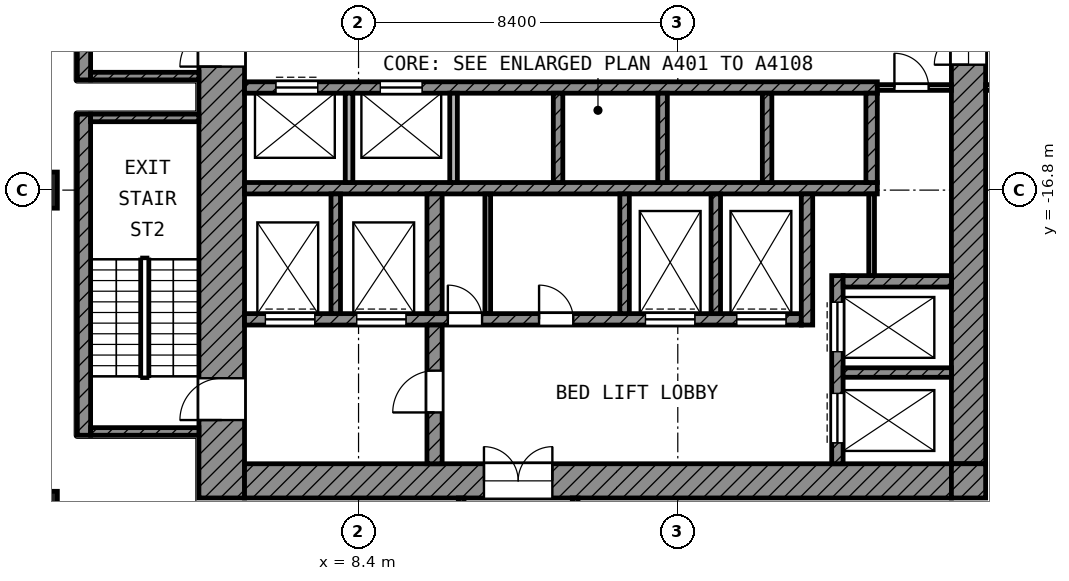
"""IFC4 building model, lengths in metres.
Left out: names, types, materials, properties, quantities, classifications, styles, units other than length and angle.
Written with IfcOpenShell. Run it as: python <this file> out.ifc"""

import sys

from ifc_helpers import new_model, si_unit, direction, frame, frame_2d, origin, origin_2d, place, context, subcontext, project, spatial, rectangle, extrude, element, fill, save


model = new_model("IFC4")
c1 = context("Model", 3, precision=1e-05, world=origin(), true_north=direction((0.0, 1.0)))
c2 = subcontext(c1, "Body", "Model", "MODEL_VIEW")
j1 = project(units=[si_unit("LENGTHUNIT", "METRE"), si_unit("PLANEANGLEUNIT", "RADIAN")], contexts=[c1])
p1 = place(None, origin())
s1 = spatial("IfcSite", under=j1, at=p1, CompositionType="ELEMENT")
p2 = place(p1, origin())
s2 = spatial("IfcBuilding", under=s1, at=p2, CompositionType="ELEMENT")
p3 = place(p2, frame((0.0, 0.0, 171.0)))
s3 = spatial("IfcBuildingStorey", under=s2, at=p3, CompositionType="ELEMENT", Elevation=171.0)
for number, where, z_axis, x_axis in (
    (1, (0.0, -16.8, 0.0), (0.0, 0.0, 1.0), (1.0, 0.0, 0.0)),
    (2, (0.0, -25.2, 0.0), (0.0, 0.0, 1.0), (1.0, 0.0, 0.0)),
):
    element("IfcColumn", number, at=place(p3, frame(where, z_axis=z_axis, x_axis=x_axis)), inside=s3, PredefinedType="COLUMN", context=c2, shape_type="SweptSolid", body=[
        extrude(rectangle(XDim=0.95, YDim=0.95, at=origin_2d()), origin(), (0.0, 0.0, 1.0), 4.2),
    ])
p4 = place(p3, frame((4.8, -24.9, 0.0), z_axis=(0.0, 0.0, 1.0), x_axis=(0.0, 1.0, 0.0)))
e3 = element("IfcWall", 3, at=p4, inside=s3, PredefinedType="SHEAR", context=c2, shape_type="SweptSolid", body=[
    extrude(rectangle(XDim=19.5, YDim=1.2, at=frame_2d((9.75, 0.0))), origin(), (0.0, 0.0, 1.0), 3.6),
])
p5 = place(p4, frame((11.35, 0.0, 0.0)))
e4 = element("IfcOpeningElement", 4, at=p5, cuts=e3, PredefinedType="OPENING", context=c2, shape_type="SweptSolid", body=[
    extrude(rectangle(XDim=1.1, YDim=2.1, at=frame_2d((0.55, 1.05))), frame((0.0, 0.61, 0.0), z_axis=(0.0, -1.0, 0.0), x_axis=(1.0, 0.0, 0.0)), (0.0, 0.0, 1.0), 1.22),
])
p6 = place(p4, frame((2.05, 0.0, 0.0)))
e5 = element("IfcOpeningElement", 5, at=p6, cuts=e3, PredefinedType="OPENING", context=c2, shape_type="SweptSolid", body=[
    extrude(rectangle(XDim=1.1, YDim=2.1, at=frame_2d((0.55, 1.05))), frame((0.0, 0.61, 0.0), z_axis=(0.0, -1.0, 0.0), x_axis=(1.0, 0.0, 0.0)), (0.0, 0.0, 1.0), 1.22),
])
p7 = place(p3, frame((24.45, -24.0, 0.0), z_axis=(0.0, 0.0, 1.0), x_axis=(0.0, 1.0, 0.0)))
e6 = element("IfcWall", 6, at=p7, inside=s3, PredefinedType="SHEAR", context=c2, shape_type="SweptSolid", body=[
    extrude(rectangle(XDim=18.6, YDim=0.9, at=frame_2d((9.3, 0.0))), origin(), (0.0, 0.0, 1.0), 3.6),
])
p8 = place(p7, frame((10.5, 0.0, 0.0)))
e7 = element("IfcOpeningElement", 7, at=p8, cuts=e6, PredefinedType="OPENING", context=c2, shape_type="SweptSolid", body=[
    extrude(rectangle(XDim=1.8, YDim=2.1, at=frame_2d((0.9, 1.05))), frame((0.0, 0.46, 0.0), z_axis=(0.0, -1.0, 0.0), x_axis=(1.0, 0.0, 0.0)), (0.0, 0.0, 1.0), 0.92),
])
p9 = place(p3, frame((5.4, -24.45, 0.0), z_axis=(0.0, 0.0, 1.0), x_axis=(1.0, 0.0, 0.0)))
e8 = element("IfcWall", 8, at=p9, inside=s3, PredefinedType="SHEAR", context=c2, shape_type="SweptSolid", body=[
    extrude(rectangle(XDim=18.6, YDim=0.9, at=frame_2d((9.3, 0.0))), origin(), (0.0, 0.0, 1.0), 3.6),
])
p10 = place(p9, frame((6.3, 0.0, 0.0)))
e9 = element("IfcOpeningElement", 9, at=p10, cuts=e8, PredefinedType="OPENING", context=c2, shape_type="SweptSolid", body=[
    extrude(rectangle(XDim=1.8, YDim=2.1, at=frame_2d((0.9, 1.05))), frame((0.0, 0.46, 0.0), z_axis=(0.0, -1.0, 0.0), x_axis=(1.0, 0.0, 0.0)), (0.0, 0.0, 1.0), 0.92),
])
p11 = place(p3, frame((24.45, -24.9, 0.0), z_axis=(0.0, 0.0, 1.0), x_axis=(0.0, 1.0, 0.0)))
e10 = element("IfcWall", 10, at=p11, inside=s3, PredefinedType="SHEAR", context=c2, shape_type="SweptSolid", body=[
    extrude(rectangle(XDim=0.9, YDim=0.9, at=frame_2d((0.45, 0.0))), origin(), (0.0, 0.0, 1.0), 3.6),
])
p12 = place(p3, frame((5.4, -14.1, 0.0), z_axis=(0.0, 0.0, 1.0), x_axis=(1.0, 0.0, 0.0)))
e11 = element("IfcWall", 11, at=p12, inside=s3, PredefinedType="SHEAR", context=c2, shape_type="SweptSolid", body=[
    extrude(rectangle(XDim=16.65, YDim=0.3, at=frame_2d((8.325, 0.0))), origin(), (0.0, 0.0, 1.0), 3.6),
])
p13 = place(p12, frame((0.825, 0.0, 0.0)))
e12 = element("IfcOpeningElement", 12, at=p13, cuts=e11, PredefinedType="OPENING", context=c2, shape_type="SweptSolid", body=[
    extrude(rectangle(XDim=1.1, YDim=2.1, at=frame_2d((0.55, 1.05))), frame((0.0, 0.16, 0.0), z_axis=(0.0, -1.0, 0.0), x_axis=(1.0, 0.0, 0.0)), (0.0, 0.0, 1.0), 0.32),
])
p14 = place(p12, frame((3.575, 0.0, 0.0)))
e13 = element("IfcOpeningElement", 13, at=p14, cuts=e11, PredefinedType="OPENING", context=c2, shape_type="SweptSolid", body=[
    extrude(rectangle(XDim=1.1, YDim=2.1, at=frame_2d((0.55, 1.05))), frame((0.0, 0.16, 0.0), z_axis=(0.0, -1.0, 0.0), x_axis=(1.0, 0.0, 0.0)), (0.0, 0.0, 1.0), 0.32),
])
p15 = place(p3, frame((5.4, -16.75, 0.0), z_axis=(0.0, 0.0, 1.0), x_axis=(1.0, 0.0, 0.0)))
e14 = element("IfcWall", 14, at=p15, inside=s3, PredefinedType="SHEAR", context=c2, shape_type="SweptSolid", body=[
    extrude(rectangle(XDim=16.65, YDim=0.3, at=frame_2d((8.325, 0.0))), origin(), (0.0, 0.0, 1.0), 3.6),
])
p16 = place(p3, frame((5.4, -20.2, 0.0), z_axis=(0.0, 0.0, 1.0), x_axis=(1.0, 0.0, 0.0)))
e15 = element("IfcWall", 15, at=p16, inside=s3, PredefinedType="SHEAR", context=c2, shape_type="SweptSolid", body=[
    extrude(rectangle(XDim=14.65, YDim=0.3, at=frame_2d((7.325, 0.0))), origin(), (0.0, 0.0, 1.0), 3.6),
])
p17 = place(p16, frame((10.55, 0.0, 0.0)))
e16 = element("IfcOpeningElement", 16, at=p17, cuts=e15, PredefinedType="OPENING", context=c2, shape_type="SweptSolid", body=[
    extrude(rectangle(XDim=1.3, YDim=2.1, at=frame_2d((0.65, 1.05))), frame((0.0, 0.16, 0.0), z_axis=(0.0, -1.0, 0.0), x_axis=(1.0, 0.0, 0.0)), (0.0, 0.0, 1.0), 0.32),
])
p18 = place(p16, frame((12.95, 0.0, 0.0)))
e17 = element("IfcOpeningElement", 17, at=p18, cuts=e15, PredefinedType="OPENING", context=c2, shape_type="SweptSolid", body=[
    extrude(rectangle(XDim=1.3, YDim=2.1, at=frame_2d((0.65, 1.05))), frame((0.0, 0.16, 0.0), z_axis=(0.0, -1.0, 0.0), x_axis=(1.0, 0.0, 0.0)), (0.0, 0.0, 1.0), 0.32),
])
p19 = place(p16, frame((0.55, 0.0, 0.0)))
e18 = element("IfcOpeningElement", 18, at=p19, cuts=e15, PredefinedType="OPENING", context=c2, shape_type="SweptSolid", body=[
    extrude(rectangle(XDim=1.3, YDim=2.1, at=frame_2d((0.65, 1.05))), frame((0.0, 0.16, 0.0), z_axis=(0.0, -1.0, 0.0), x_axis=(1.0, 0.0, 0.0)), (0.0, 0.0, 1.0), 0.32),
])
p20 = place(p16, frame((2.95, 0.0, 0.0)))
e19 = element("IfcOpeningElement", 19, at=p20, cuts=e15, PredefinedType="OPENING", context=c2, shape_type="SweptSolid", body=[
    extrude(rectangle(XDim=1.3, YDim=2.1, at=frame_2d((0.65, 1.05))), frame((0.0, 0.16, 0.0), z_axis=(0.0, -1.0, 0.0), x_axis=(1.0, 0.0, 0.0)), (0.0, 0.0, 1.0), 0.32),
])
p21 = place(p16, frame((5.35, 0.0, 0.0)))
e20 = element("IfcOpeningElement", 20, at=p21, cuts=e15, PredefinedType="OPENING", context=c2, shape_type="SweptSolid", body=[
    extrude(rectangle(XDim=0.9, YDim=2.1, at=frame_2d((0.45, 1.05))), frame((0.0, 0.16, 0.0), z_axis=(0.0, -1.0, 0.0), x_axis=(1.0, 0.0, 0.0)), (0.0, 0.0, 1.0), 0.32),
])
p22 = place(p16, frame((7.75, 0.0, 0.0)))
e21 = element("IfcOpeningElement", 21, at=p22, cuts=e15, PredefinedType="OPENING", context=c2, shape_type="SweptSolid", body=[
    extrude(rectangle(XDim=0.9, YDim=2.1, at=frame_2d((0.45, 1.05))), frame((0.0, 0.16, 0.0), z_axis=(0.0, -1.0, 0.0), x_axis=(1.0, 0.0, 0.0)), (0.0, 0.0, 1.0), 0.32),
])
p23 = place(p3, frame((10.4, -24.0, 0.0), z_axis=(0.0, 0.0, 1.0), x_axis=(0.0, 1.0, 0.0)))
e22 = element("IfcWall", 22, at=p23, inside=s3, PredefinedType="SHEAR", context=c2, shape_type="SweptSolid", body=[
    extrude(rectangle(XDim=3.65, YDim=0.4, at=frame_2d((1.825, 0.0))), origin(), (0.0, 0.0, 1.0), 3.6),
])
p24 = place(p23, frame((1.35, 0.0, 0.0)))
e23 = element("IfcOpeningElement", 23, at=p24, cuts=e22, PredefinedType="OPENING", context=c2, shape_type="SweptSolid", body=[
    extrude(rectangle(XDim=1.1, YDim=2.1, at=frame_2d((0.55, 1.05))), frame((0.0, 0.21, 0.0), z_axis=(0.0, -1.0, 0.0), x_axis=(1.0, 0.0, 0.0)), (0.0, 0.0, 1.0), 0.42),
])
p25 = place(p3, frame((10.4, -20.05, 0.0), z_axis=(0.0, 0.0, 1.0), x_axis=(0.0, 1.0, 0.0)))
e24 = element("IfcWall", 24, at=p25, inside=s3, PredefinedType="SHEAR", context=c2, shape_type="SweptSolid", body=[
    extrude(rectangle(XDim=3.15, YDim=0.4, at=frame_2d((1.575, 0.0))), origin(), (0.0, 0.0, 1.0), 3.6),
])
p26 = place(p3, frame((20.2, -20.35, 0.0), z_axis=(0.0, 0.0, 1.0), x_axis=(0.0, 1.0, 0.0)))
e25 = element("IfcWall", 25, at=p26, inside=s3, PredefinedType="SHEAR", context=c2, shape_type="SweptSolid", body=[
    extrude(rectangle(XDim=3.45, YDim=0.3, at=frame_2d((1.725, 0.0))), origin(), (0.0, 0.0, 1.0), 3.6),
])
p27 = place(p3, frame((21.9, -16.6, 0.0), z_axis=(0.0, 0.0, 1.0), x_axis=(0.0, 1.0, 0.0)))
e26 = element("IfcWall", 26, at=p27, inside=s3, PredefinedType="SHEAR", context=c2, shape_type="SweptSolid", body=[
    extrude(rectangle(XDim=2.35, YDim=0.3, at=frame_2d((1.175, 0.0))), origin(), (0.0, 0.0, 1.0), 3.6),
])
p28 = place(p3, frame((21.15, -19.2, 0.0), z_axis=(0.0, 0.0, 1.0), x_axis=(1.0, 0.0, 0.0)))
e27 = element("IfcWall", 27, at=p28, inside=s3, PredefinedType="SHEAR", context=c2, shape_type="SweptSolid", body=[
    extrude(rectangle(XDim=2.85, YDim=0.3, at=frame_2d((1.425, 0.0))), origin(), (0.0, 0.0, 1.0), 3.6),
])
p29 = place(p3, frame((21.0, -24.0, 0.0), z_axis=(0.0, 0.0, 1.0), x_axis=(0.0, 1.0, 0.0)))
e28 = element("IfcWall", 28, at=p29, inside=s3, PredefinedType="SHEAR", context=c2, shape_type="SweptSolid", body=[
    extrude(rectangle(XDim=4.95, YDim=0.3, at=frame_2d((2.475, 0.0))), origin(), (0.0, 0.0, 1.0), 3.6),
])
p30 = place(p29, frame((2.95, 0.0, 0.0)))
e29 = element("IfcOpeningElement", 29, at=p30, cuts=e28, PredefinedType="OPENING", context=c2, shape_type="SweptSolid", body=[
    extrude(rectangle(XDim=1.3, YDim=2.1, at=frame_2d((0.65, 1.05))), frame((0.0, 0.16, 0.0), z_axis=(0.0, -1.0, 0.0), x_axis=(1.0, 0.0, 0.0)), (0.0, 0.0, 1.0), 0.32),
])
p31 = place(p29, frame((0.55, 0.0, 0.0)))
e30 = element("IfcOpeningElement", 30, at=p31, cuts=e28, PredefinedType="OPENING", context=c2, shape_type="SweptSolid", body=[
    extrude(rectangle(XDim=1.3, YDim=2.1, at=frame_2d((0.65, 1.05))), frame((0.0, 0.16, 0.0), z_axis=(0.0, -1.0, 0.0), x_axis=(1.0, 0.0, 0.0)), (0.0, 0.0, 1.0), 0.32),
])
p32 = place(p3, frame((21.15, -21.6, 0.0), z_axis=(0.0, 0.0, 1.0), x_axis=(1.0, 0.0, 0.0)))
e31 = element("IfcWall", 31, at=p32, inside=s3, PredefinedType="SHEAR", context=c2, shape_type="SweptSolid", body=[
    extrude(rectangle(XDim=2.85, YDim=0.25, at=frame_2d((1.425, 0.0))), origin(), (0.0, 0.0, 1.0), 3.6),
])
for number, where, z_axis, x_axis in (
    (32, (7.8, -20.05, 0.0), (0.0, 0.0, 1.0), (0.0, 1.0, 0.0)),
    (33, (15.4, -20.05, 0.0), (0.0, 0.0, 1.0), (0.0, 1.0, 0.0)),
    (34, (17.8, -20.05, 0.0), (0.0, 0.0, 1.0), (0.0, 1.0, 0.0)),
):
    element("IfcWall", number, at=place(p3, frame(where, z_axis=z_axis, x_axis=x_axis)), inside=s3, PredefinedType="SHEAR", context=c2, shape_type="SweptSolid", body=[
        extrude(rectangle(XDim=3.15, YDim=0.25, at=frame_2d((1.575, 0.0))), origin(), (0.0, 0.0, 1.0), 3.6),
    ])
for number, where, z_axis, x_axis in (
    (35, (8.15, -16.6, 0.0), (0.0, 0.0, 1.0), (0.0, 1.0, 0.0)),
    (36, (10.9, -16.6, 0.0), (0.0, 0.0, 1.0), (0.0, 1.0, 0.0)),
):
    element("IfcWall", number, at=place(p3, frame(where, z_axis=z_axis, x_axis=x_axis)), inside=s3, PredefinedType="PARTITIONING", context=c2, shape_type="SweptSolid", body=[
        extrude(rectangle(XDim=2.35, YDim=0.2, at=frame_2d((1.175, 0.0))), origin(), (0.0, 0.0, 1.0), 3.6),
    ])
for number, where, z_axis, x_axis in (
    (37, (13.65, -16.6, 0.0), (0.0, 0.0, 1.0), (0.0, 1.0, 0.0)),
    (38, (16.4, -16.6, 0.0), (0.0, 0.0, 1.0), (0.0, 1.0, 0.0)),
    (39, (19.15, -16.6, 0.0), (0.0, 0.0, 1.0), (0.0, 1.0, 0.0)),
):
    element("IfcWall", number, at=place(p3, frame(where, z_axis=z_axis, x_axis=x_axis)), inside=s3, PredefinedType="SHEAR", context=c2, shape_type="SweptSolid", body=[
        extrude(rectangle(XDim=2.35, YDim=0.25, at=frame_2d((1.175, 0.0))), origin(), (0.0, 0.0, 1.0), 3.6),
    ])
p33 = place(p3, frame((21.9, -19.05, 0.0), z_axis=(0.0, 0.0, 1.0), x_axis=(0.0, 1.0, 0.0)))
e40 = element("IfcWall", 40, at=p33, inside=s3, PredefinedType="PARTITIONING", context=c2, shape_type="SweptSolid", body=[
    extrude(rectangle(XDim=2.15, YDim=0.15, at=frame_2d((1.075, 0.0))), origin(), (0.0, 0.0, 1.0), 3.6),
])
p34 = place(p3, frame((22.05, -14.1, 0.0), z_axis=(0.0, 0.0, 1.0), x_axis=(1.0, 0.0, 0.0)))
e41 = element("IfcWall", 41, at=p34, inside=s3, PredefinedType="PARTITIONING", context=c2, shape_type="SweptSolid", body=[
    extrude(rectangle(XDim=1.95, YDim=0.15, at=frame_2d((0.975, 0.0))), origin(), (0.0, 0.0, 1.0), 3.6),
])
p35 = place(p34, frame((0.45, 0.0, 0.0)))
e42 = element("IfcOpeningElement", 42, at=p35, cuts=e41, PredefinedType="OPENING", context=c2, shape_type="SweptSolid", body=[
    extrude(rectangle(XDim=0.9, YDim=2.1, at=frame_2d((0.45, 1.05))), frame((0.0, 0.085, 0.0), z_axis=(0.0, -1.0, 0.0), x_axis=(1.0, 0.0, 0.0)), (0.0, 0.0, 1.0), 0.17),
])
p36 = place(p3, frame((11.8, -20.05, 0.0), z_axis=(0.0, 0.0, 1.0), x_axis=(0.0, 1.0, 0.0)))
e43 = element("IfcWall", 43, at=p36, inside=s3, PredefinedType="PARTITIONING", context=c2, shape_type="SweptSolid", body=[
    extrude(rectangle(XDim=3.15, YDim=0.15, at=frame_2d((1.575, 0.0))), origin(), (0.0, 0.0, 1.0), 3.6),
])
p37 = place(p3, frame((1.175, -13.9, 0.0), z_axis=(0.0, 0.0, 1.0), x_axis=(0.0, 1.0, 0.0)))
e44 = element("IfcWall", 44, at=p37, inside=s3, PredefinedType="SHEAR", context=c2, shape_type="SweptSolid", body=[
    extrude(rectangle(XDim=8.45, YDim=0.35, at=frame_2d((4.225, 0.0))), origin(), (0.0, 0.0, 1.0), 3.6),
])
p38 = place(p3, frame((1.35, -13.8, 0.0), z_axis=(0.0, 0.0, 1.0), x_axis=(1.0, 0.0, 0.0)))
e45 = element("IfcWall", 45, at=p38, inside=s3, PredefinedType="SHEAR", context=c2, shape_type="SweptSolid", body=[
    extrude(rectangle(XDim=2.85, YDim=0.2, at=frame_2d((1.425, 0.0))), origin(), (0.0, 0.0, 1.0), 3.6),
])
p39 = place(p3, frame((1.175, -23.25, 0.0), z_axis=(0.0, 0.0, 1.0), x_axis=(0.0, 1.0, 0.0)))
e46 = element("IfcWall", 46, at=p39, inside=s3, PredefinedType="SHEAR", context=c2, shape_type="SweptSolid", body=[
    extrude(rectangle(XDim=8.45, YDim=0.35, at=frame_2d((4.225, 0.0))), origin(), (0.0, 0.0, 1.0), 3.6),
])
for number, where, z_axis, x_axis in (
    (47, (1.35, -14.9, 0.0), (0.0, 0.0, 1.0), (1.0, 0.0, 0.0)),
    (48, (1.35, -23.15, 0.0), (0.0, 0.0, 1.0), (1.0, 0.0, 0.0)),
):
    element("IfcWall", number, at=place(p3, frame(where, z_axis=z_axis, x_axis=x_axis)), inside=s3, PredefinedType="SHEAR", context=c2, shape_type="SweptSolid", body=[
        extrude(rectangle(XDim=2.85, YDim=0.2, at=frame_2d((1.425, 0.0))), origin(), (0.0, 0.0, 1.0), 3.6),
    ])
p40 = place(p3, frame((24.9, -14.1, 0.0), z_axis=(0.0, 0.0, 1.0), x_axis=(1.0, 0.0, 0.0)))
e49 = element("IfcWall", 49, at=p40, inside=s3, PredefinedType="PARTITIONING", context=c2, shape_type="SweptSolid", body=[
    extrude(rectangle(XDim=4.425, YDim=0.15, at=frame_2d((2.212, 0.0))), origin(), (0.0, 0.0, 1.0), 3.6),
])
p41 = place(p40, frame((1.65, 0.0, 0.0)))
e50 = element("IfcOpeningElement", 50, at=p41, cuts=e49, PredefinedType="OPENING", context=c2, shape_type="SweptSolid", body=[
    extrude(rectangle(XDim=1.5, YDim=2.1, at=frame_2d((0.75, 1.05))), frame((0.0, 0.085, 0.0), z_axis=(0.0, -1.0, 0.0), x_axis=(1.0, 0.0, 0.0)), (0.0, 0.0, 1.0), 0.17),
])
p42 = place(p3, frame((11.1, -29.397, 0.0), z_axis=(0.0, 0.0, 1.0), x_axis=(0.0, 1.0, 0.0)))
e51 = element("IfcWall", 51, at=p42, inside=s3, PredefinedType="PARTITIONING", context=c2, shape_type="SweptSolid", body=[
    extrude(rectangle(XDim=4.497, YDim=0.15, at=frame_2d((2.249, 0.0))), origin(), (0.0, 0.0, 1.0), 3.6),
])
p43 = place(p3, frame((14.1, -29.4, 0.0), z_axis=(0.0, 0.0, 1.0), x_axis=(0.0, 1.0, 0.0)))
e52 = element("IfcWall", 52, at=p43, inside=s3, PredefinedType="PARTITIONING", context=c2, shape_type="SweptSolid", body=[
    extrude(rectangle(XDim=4.5, YDim=0.15, at=frame_2d((2.25, 0.0))), origin(), (0.0, 0.0, 1.0), 3.6),
])
p44 = place(p13, origin())
e53 = element("IfcDoor", 53, at=p44, inside=s3, OperationType="DOUBLE_DOOR_SLIDING", PredefinedType="DOOR", context=c2, shape_type="SweptSolid", body=[
    extrude(rectangle(XDim=1.1, YDim=2.1, at=frame_2d((0.55, 1.05))), frame((0.0, 0.025, 0.0), z_axis=(0.0, -1.0, 0.0), x_axis=(1.0, 0.0, 0.0)), (0.0, 0.0, 1.0), 0.05),
])
fill(e12, e53)
p45 = place(p14, origin())
e54 = element("IfcDoor", 54, at=p45, inside=s3, OperationType="DOUBLE_DOOR_SLIDING", PredefinedType="DOOR", context=c2, shape_type="SweptSolid", body=[
    extrude(rectangle(XDim=1.1, YDim=2.1, at=frame_2d((0.55, 1.05))), frame((0.0, 0.025, 0.0), z_axis=(0.0, -1.0, 0.0), x_axis=(1.0, 0.0, 0.0)), (0.0, 0.0, 1.0), 0.05),
])
fill(e13, e54)
p46 = place(p30, origin())
e55 = element("IfcDoor", 55, at=p46, inside=s3, OperationType="DOUBLE_DOOR_SLIDING", PredefinedType="DOOR", context=c2, shape_type="SweptSolid", body=[
    extrude(rectangle(XDim=1.3, YDim=2.1, at=frame_2d((0.65, 1.05))), frame((0.0, 0.025, 0.0), z_axis=(0.0, -1.0, 0.0), x_axis=(1.0, 0.0, 0.0)), (0.0, 0.0, 1.0), 0.05),
])
fill(e29, e55)
p47 = place(p31, origin())
e56 = element("IfcDoor", 56, at=p47, inside=s3, OperationType="DOUBLE_DOOR_SLIDING", PredefinedType="DOOR", context=c2, shape_type="SweptSolid", body=[
    extrude(rectangle(XDim=1.3, YDim=2.1, at=frame_2d((0.65, 1.05))), frame((0.0, 0.025, 0.0), z_axis=(0.0, -1.0, 0.0), x_axis=(1.0, 0.0, 0.0)), (0.0, 0.0, 1.0), 0.05),
])
fill(e30, e56)
p48 = place(p17, origin())
e57 = element("IfcDoor", 57, at=p48, inside=s3, OperationType="DOUBLE_DOOR_SLIDING", PredefinedType="DOOR", context=c2, shape_type="SweptSolid", body=[
    extrude(rectangle(XDim=1.3, YDim=2.1, at=frame_2d((0.65, 1.05))), frame((0.0, 0.025, 0.0), z_axis=(0.0, -1.0, 0.0), x_axis=(1.0, 0.0, 0.0)), (0.0, 0.0, 1.0), 0.05),
])
fill(e16, e57)
p49 = place(p18, origin())
e58 = element("IfcDoor", 58, at=p49, inside=s3, OperationType="DOUBLE_DOOR_SLIDING", PredefinedType="DOOR", context=c2, shape_type="SweptSolid", body=[
    extrude(rectangle(XDim=1.3, YDim=2.1, at=frame_2d((0.65, 1.05))), frame((0.0, 0.025, 0.0), z_axis=(0.0, -1.0, 0.0), x_axis=(1.0, 0.0, 0.0)), (0.0, 0.0, 1.0), 0.05),
])
fill(e17, e58)
p50 = place(p19, origin())
e59 = element("IfcDoor", 59, at=p50, inside=s3, OperationType="DOUBLE_DOOR_SLIDING", PredefinedType="DOOR", context=c2, shape_type="SweptSolid", body=[
    extrude(rectangle(XDim=1.3, YDim=2.1, at=frame_2d((0.65, 1.05))), frame((0.0, 0.025, 0.0), z_axis=(0.0, -1.0, 0.0), x_axis=(1.0, 0.0, 0.0)), (0.0, 0.0, 1.0), 0.05),
])
fill(e18, e59)
p51 = place(p20, origin())
e60 = element("IfcDoor", 60, at=p51, inside=s3, OperationType="DOUBLE_DOOR_SLIDING", PredefinedType="DOOR", context=c2, shape_type="SweptSolid", body=[
    extrude(rectangle(XDim=1.3, YDim=2.1, at=frame_2d((0.65, 1.05))), frame((0.0, 0.025, 0.0), z_axis=(0.0, -1.0, 0.0), x_axis=(1.0, 0.0, 0.0)), (0.0, 0.0, 1.0), 0.05),
])
fill(e19, e60)
p52 = place(p5, origin())
e61 = element("IfcDoor", 61, at=p52, inside=s3, OperationType="SINGLE_SWING_LEFT", PredefinedType="DOOR", context=c2, shape_type="SweptSolid", body=[
    extrude(rectangle(XDim=1.1, YDim=2.1, at=frame_2d((0.55, 1.05))), frame((0.0, 0.025, 0.0), z_axis=(0.0, -1.0, 0.0), x_axis=(1.0, 0.0, 0.0)), (0.0, 0.0, 1.0), 0.05),
])
fill(e4, e61)
p53 = place(p6, origin())
e62 = element("IfcDoor", 62, at=p53, inside=s3, OperationType="SINGLE_SWING_LEFT", PredefinedType="DOOR", context=c2, shape_type="SweptSolid", body=[
    extrude(rectangle(XDim=1.1, YDim=2.1, at=frame_2d((0.55, 1.05))), frame((0.0, 0.025, 0.0), z_axis=(0.0, -1.0, 0.0), x_axis=(1.0, 0.0, 0.0)), (0.0, 0.0, 1.0), 0.05),
])
fill(e5, e62)
p54 = place(p24, origin())
e63 = element("IfcDoor", 63, at=p54, inside=s3, OperationType="SINGLE_SWING_LEFT", PredefinedType="DOOR", context=c2, shape_type="SweptSolid", body=[
    extrude(rectangle(XDim=1.1, YDim=2.1, at=frame_2d((0.55, 1.05))), frame((0.0, 0.025, 0.0), z_axis=(0.0, -1.0, 0.0), x_axis=(1.0, 0.0, 0.0)), (0.0, 0.0, 1.0), 0.05),
])
fill(e23, e63)
p55 = place(p8, origin())
e64 = element("IfcDoor", 64, at=p55, inside=s3, OperationType="DOUBLE_DOOR_SINGLE_SWING", PredefinedType="DOOR", context=c2, shape_type="SweptSolid", body=[
    extrude(rectangle(XDim=1.8, YDim=2.1, at=frame_2d((0.9, 1.05))), frame((0.0, 0.025, 0.0), z_axis=(0.0, -1.0, 0.0), x_axis=(1.0, 0.0, 0.0)), (0.0, 0.0, 1.0), 0.05),
])
fill(e7, e64)
p56 = place(p10, origin())
e65 = element("IfcDoor", 65, at=p56, inside=s3, OperationType="DOUBLE_DOOR_SINGLE_SWING", PredefinedType="DOOR", context=c2, shape_type="SweptSolid", body=[
    extrude(rectangle(XDim=1.8, YDim=2.1, at=frame_2d((0.9, 1.05))), frame((0.0, 0.025, 0.0), z_axis=(0.0, -1.0, 0.0), x_axis=(1.0, 0.0, 0.0)), (0.0, 0.0, 1.0), 0.05),
])
fill(e9, e65)
p57 = place(p35, origin())
e66 = element("IfcDoor", 66, at=p57, inside=s3, OperationType="SINGLE_SWING_LEFT", PredefinedType="DOOR", context=c2, shape_type="SweptSolid", body=[
    extrude(rectangle(XDim=0.9, YDim=2.1, at=frame_2d((0.45, 1.05))), frame((0.0, 0.025, 0.0), z_axis=(0.0, -1.0, 0.0), x_axis=(1.0, 0.0, 0.0)), (0.0, 0.0, 1.0), 0.05),
])
fill(e42, e66)
p58 = place(p21, origin())
e67 = element("IfcDoor", 67, at=p58, inside=s3, OperationType="SINGLE_SWING_LEFT", PredefinedType="DOOR", context=c2, shape_type="SweptSolid", body=[
    extrude(rectangle(XDim=0.9, YDim=2.1, at=frame_2d((0.45, 1.05))), frame((0.0, 0.025, 0.0), z_axis=(0.0, -1.0, 0.0), x_axis=(1.0, 0.0, 0.0)), (0.0, 0.0, 1.0), 0.05),
])
fill(e20, e67)
p59 = place(p22, origin())
e68 = element("IfcDoor", 68, at=p59, inside=s3, OperationType="SINGLE_SWING_LEFT", PredefinedType="DOOR", context=c2, shape_type="SweptSolid", body=[
    extrude(rectangle(XDim=0.9, YDim=2.1, at=frame_2d((0.45, 1.05))), frame((0.0, 0.025, 0.0), z_axis=(0.0, -1.0, 0.0), x_axis=(1.0, 0.0, 0.0)), (0.0, 0.0, 1.0), 0.05),
])
fill(e21, e68)
save(model, sys.argv[1])
